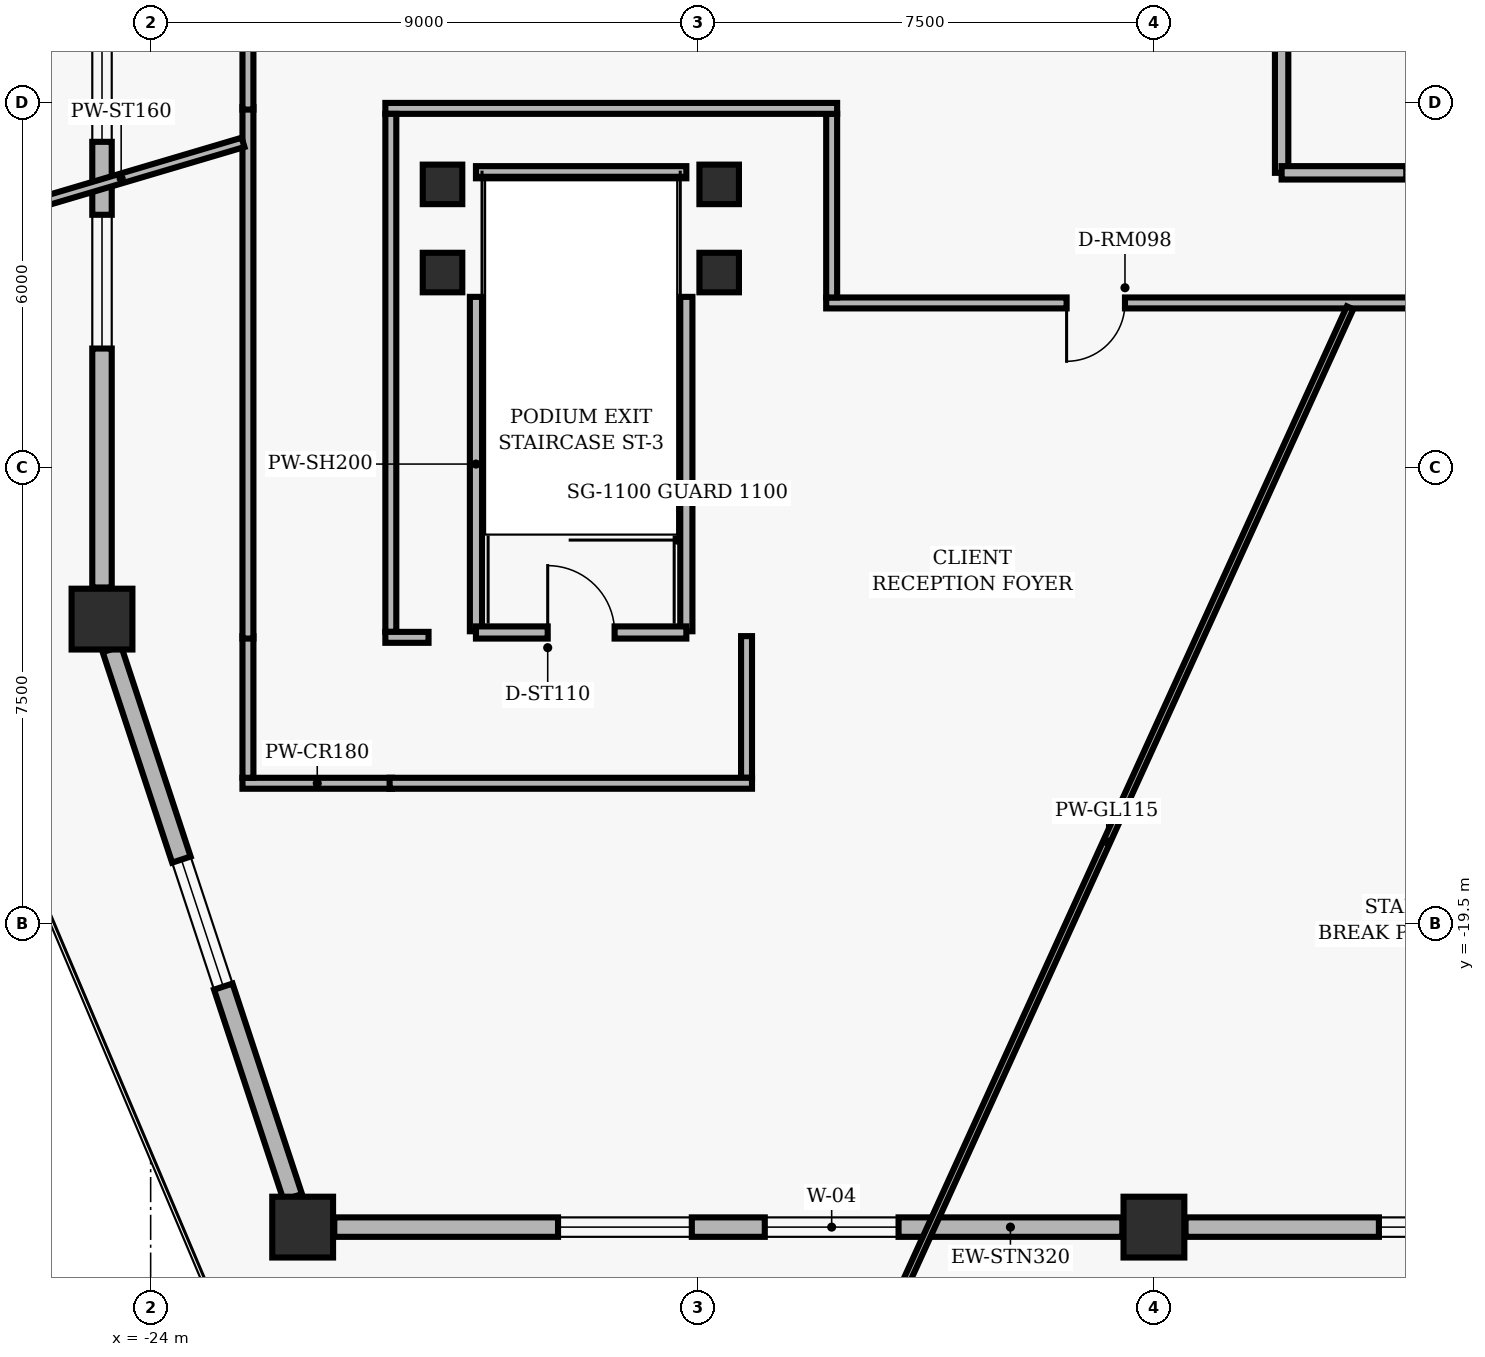
"""IFC4 building model, lengths in metres.
Left out: names, types, materials, properties, quantities, classifications, styles, units other than length and angle.
Written with IfcOpenShell. Run it as: python <this file> out.ifc"""

import sys

from ifc_helpers import new_model, si_unit, direction, frame, frame_2d, origin, origin_2d, place, context, subcontext, project, spatial, rectangle, extrude, element, fill, save


model = new_model("IFC4")
c1 = context("Model", 3, precision=1e-05, world=origin(), true_north=direction((0.0, 1.0)))
c2 = subcontext(c1, "Body", "Model", "MODEL_VIEW")
j1 = project(units=[si_unit("LENGTHUNIT", "METRE"), si_unit("PLANEANGLEUNIT", "RADIAN")], contexts=[c1])
p1 = place(None, origin())
s1 = spatial("IfcSite", under=j1, at=p1, CompositionType="ELEMENT")
p2 = place(p1, origin())
s2 = spatial("IfcBuilding", under=s1, at=p2, CompositionType="ELEMENT")
p3 = place(p2, frame((0.0, 0.0, 15.36)))
s3 = spatial("IfcBuildingStorey", under=s2, at=p3, CompositionType="ELEMENT", Elevation=15.36)
for number, where, z_axis, x_axis in (
    (1, (-21.5, -24.5, 0.0), (0.0, 0.0, 1.0), (1.0, 0.0, 0.0)),
    (2, (-7.5, -24.5, 0.0), (0.0, 0.0, 1.0), (1.0, 0.0, 0.0)),
    (3, (-24.8, -14.5, 0.0), (0.0, 0.0, 1.0), (1.0, 0.0, 0.0)),
):
    element("IfcColumn", number, at=place(p3, frame(where, z_axis=z_axis, x_axis=x_axis)), inside=s3, PredefinedType="COLUMN", context=c2, shape_type="SweptSolid", body=[
        extrude(rectangle(XDim=1.0, YDim=1.0, at=origin_2d()), origin(), (0.0, 0.0, 1.0), 3.52),
    ])
for number, where, z_axis, x_axis in (
    (4, (-19.2, -8.8, 0.0), (0.0, 0.0, 1.0), (1.0, 0.0, 0.0)),
    (5, (-14.65, -8.8, 0.0), (0.0, 0.0, 1.0), (1.0, 0.0, 0.0)),
    (6, (-19.2, -7.35, 0.0), (0.0, 0.0, 1.0), (1.0, 0.0, 0.0)),
    (7, (-14.65, -7.35, 0.0), (0.0, 0.0, 1.0), (1.0, 0.0, 0.0)),
):
    element("IfcColumn", number, at=place(p3, frame(where, z_axis=z_axis, x_axis=x_axis)), inside=s3, PredefinedType="COLUMN", context=c2, shape_type="SweptSolid", body=[
        extrude(rectangle(XDim=0.65, YDim=0.65, at=origin_2d()), origin(), (0.0, 0.0, 1.0), 3.52),
    ])
p4 = place(p3, frame((-8.02, -24.5, 0.0), z_axis=(0.0, 0.0, 1.0), x_axis=(-1.0, 0.0, 0.0)))
e8 = element("IfcWall", 8, at=p4, inside=s3, PredefinedType="SOLIDWALL", context=c2, shape_type="SweptSolid", body=[
    extrude(rectangle(XDim=12.96, YDim=0.32, at=frame_2d((6.48, 0.0))), origin(), (0.0, 0.0, 1.0), 1.65),
])
p5 = place(p4, frame((3.68, 0.0, 0.4)))
e9 = element("IfcOpeningElement", 9, at=p5, cuts=e8, PredefinedType="OPENING", context=c2, shape_type="SweptSolid", body=[
    extrude(rectangle(XDim=2.2, YDim=1.1, at=frame_2d((1.1, 0.55))), frame((0.0, 0.17, 0.0), z_axis=(0.0, -1.0, 0.0), x_axis=(1.0, 0.0, 0.0)), (0.0, 0.0, 1.0), 0.34),
])
p6 = place(p4, frame((7.08, 0.0, 0.4)))
e10 = element("IfcOpeningElement", 10, at=p6, cuts=e8, PredefinedType="OPENING", context=c2, shape_type="SweptSolid", body=[
    extrude(rectangle(XDim=2.2, YDim=1.1, at=frame_2d((1.1, 0.55))), frame((0.0, 0.17, 0.0), z_axis=(0.0, -1.0, 0.0), x_axis=(1.0, 0.0, 0.0)), (0.0, 0.0, 1.0), 0.34),
])
p7 = place(p3, frame((4.98, -24.5, 0.0), z_axis=(0.0, 0.0, 1.0), x_axis=(-1.0, 0.0, 0.0)))
e11 = element("IfcWall", 11, at=p7, inside=s3, PredefinedType="SOLIDWALL", context=c2, shape_type="SweptSolid", body=[
    extrude(rectangle(XDim=11.96, YDim=0.32, at=frame_2d((5.98, 0.0))), origin(), (0.0, 0.0, 1.0), 1.65),
])
p8 = place(p7, frame((3.18, 0.0, 0.4)))
e12 = element("IfcOpeningElement", 12, at=p8, cuts=e11, PredefinedType="OPENING", context=c2, shape_type="SweptSolid", body=[
    extrude(rectangle(XDim=2.2, YDim=1.1, at=frame_2d((1.1, 0.55))), frame((0.0, 0.17, 0.0), z_axis=(0.0, -1.0, 0.0), x_axis=(1.0, 0.0, 0.0)), (0.0, 0.0, 1.0), 0.34),
])
p9 = place(p7, frame((6.58, 0.0, 0.4)))
e13 = element("IfcOpeningElement", 13, at=p9, cuts=e11, PredefinedType="OPENING", context=c2, shape_type="SweptSolid", body=[
    extrude(rectangle(XDim=2.2, YDim=1.1, at=frame_2d((1.1, 0.55))), frame((0.0, 0.17, 0.0), z_axis=(0.0, -1.0, 0.0), x_axis=(1.0, 0.0, 0.0)), (0.0, 0.0, 1.0), 0.34),
])
p10 = place(p3, frame((-24.8, -13.98, 0.0), z_axis=(0.0, 0.0, 1.0), x_axis=(0.0, 1.0, 0.0)))
e14 = element("IfcWall", 14, at=p10, inside=s3, PredefinedType="SOLIDWALL", context=c2, shape_type="SweptSolid", body=[
    extrude(rectangle(XDim=13.46, YDim=0.32, at=frame_2d((6.73, 0.0))), origin(), (0.0, 0.0, 1.0), 1.65),
])
p11 = place(p10, frame((3.93, 0.0, 0.4)))
e15 = element("IfcOpeningElement", 15, at=p11, cuts=e14, PredefinedType="OPENING", context=c2, shape_type="SweptSolid", body=[
    extrude(rectangle(XDim=2.2, YDim=1.1, at=frame_2d((1.1, 0.55))), frame((0.0, 0.17, 0.0), z_axis=(0.0, -1.0, 0.0), x_axis=(1.0, 0.0, 0.0)), (0.0, 0.0, 1.0), 0.34),
])
p12 = place(p10, frame((7.33, 0.0, 0.4)))
e16 = element("IfcOpeningElement", 16, at=p12, cuts=e14, PredefinedType="OPENING", context=c2, shape_type="SweptSolid", body=[
    extrude(rectangle(XDim=2.2, YDim=1.1, at=frame_2d((1.1, 0.55))), frame((0.0, 0.17, 0.0), z_axis=(0.0, -1.0, 0.0), x_axis=(1.0, 0.0, 0.0)), (0.0, 0.0, 1.0), 0.34),
])
p13 = place(p3, frame((-21.663, -24.006, 0.0), z_axis=(0.0, 0.0, 1.0), x_axis=(-0.313363070681, 0.949633395544, 0.0)))
e17 = element("IfcWall", 17, at=p13, inside=s3, PredefinedType="SOLIDWALL", context=c2, shape_type="SweptSolid", body=[
    extrude(rectangle(XDim=9.49, YDim=0.32, at=frame_2d((4.745, 0.0))), origin(), (0.0, 0.0, 1.0), 1.65),
])
p14 = place(p13, frame((3.645, 0.0, 0.4)))
e18 = element("IfcOpeningElement", 18, at=p14, cuts=e17, PredefinedType="OPENING", context=c2, shape_type="SweptSolid", body=[
    extrude(rectangle(XDim=2.2, YDim=1.1, at=frame_2d((1.1, 0.55))), frame((0.0, 0.17, 0.0), z_axis=(0.0, -1.0, 0.0), x_axis=(1.0, 0.0, 0.0)), (0.0, 0.0, 1.0), 0.34),
])
p15 = place(p3, frame((-5.4, -7.16, 0.0), z_axis=(0.0, 0.0, 1.0), x_axis=(0.0, 1.0, 0.0)))
e19 = element("IfcWall", 19, at=p15, inside=s3, PredefinedType="PARTITIONING", context=c2, shape_type="SweptSolid", body=[
    extrude(rectangle(XDim=2.71, YDim=0.22, at=frame_2d((1.355, 0.0))), origin(), (0.0, 0.0, 1.0), 3.073),
])
p16 = place(p3, frame((-5.4, -7.16, 0.0), z_axis=(0.0, 0.0, 1.0), x_axis=(1.0, 0.0, 0.0)))
e20 = element("IfcWall", 20, at=p16, inside=s3, PredefinedType="PARTITIONING", context=c2, shape_type="SweptSolid", body=[
    extrude(rectangle(XDim=5.4, YDim=0.22, at=frame_2d((2.7, 0.0))), origin(), (0.0, 0.0, 1.0), 3.073),
])
p17 = place(p16, frame((2.05, 0.0, 0.0)))
e21 = element("IfcOpeningElement", 21, at=p17, cuts=e20, PredefinedType="OPENING", context=c2, shape_type="SweptSolid", body=[
    extrude(rectangle(XDim=1.12, YDim=2.02, at=frame_2d((0.56, 1.01))), frame((0.0, 0.12, 0.0), z_axis=(0.0, -1.0, 0.0), x_axis=(1.0, 0.0, 0.0)), (0.0, 0.0, 1.0), 0.24),
])
for number, where, z_axis, x_axis in (
    (22, (-18.65, -14.7, 0.0), (0.0, 0.0, 1.0), (0.0, 1.0, 0.0)),
    (23, (-15.19, -14.7, 0.0), (0.0, 0.0, 1.0), (0.0, 1.0, 0.0)),
):
    element("IfcWall", number, at=place(p3, frame(where, z_axis=z_axis, x_axis=x_axis)), inside=s3, PredefinedType="PARTITIONING", context=c2, shape_type="SweptSolid", body=[
        extrude(rectangle(XDim=5.5, YDim=0.2, at=frame_2d((2.75, 0.0))), origin(), (0.0, 0.0, 1.0), 3.073),
    ])
p18 = place(p3, frame((-18.65, -7.15, 0.0), z_axis=(0.0, 0.0, 1.0), x_axis=(1.0, 0.0, 0.0)))
e24 = element("IfcWall", 24, at=p18, inside=s3, PredefinedType="PARTITIONING", context=c2, shape_type="SweptSolid", body=[
    extrude(rectangle(XDim=3.46, YDim=0.2, at=frame_2d((1.73, 0.0))), origin(), (0.0, 0.0, 1.0), 3.073),
])
p19 = place(p3, frame((-18.65, -14.72, 0.0), z_axis=(0.0, 0.0, 1.0), x_axis=(1.0, 0.0, 0.0)))
e25 = element("IfcWall", 25, at=p19, inside=s3, PredefinedType="PARTITIONING", context=c2, shape_type="SweptSolid", body=[
    extrude(rectangle(XDim=3.46, YDim=0.2, at=frame_2d((1.73, 0.0))), origin(), (0.0, 0.0, 1.0), 3.073),
])
p20 = place(p19, frame((1.18, 0.0, 0.0)))
e26 = element("IfcOpeningElement", 26, at=p20, cuts=e25, PredefinedType="OPENING", context=c2, shape_type="SweptSolid", body=[
    extrude(rectangle(XDim=1.1, YDim=2.04, at=frame_2d((0.55, 1.02))), frame((0.0, 0.11, 0.0), z_axis=(0.0, -1.0, 0.0), x_axis=(1.0, 0.0, 0.0)), (0.0, 0.0, 1.0), 0.22),
])
p21 = place(p3, frame((-20.03, -17.2, 0.0), z_axis=(0.0, 0.0, 1.0), x_axis=(-1.0, 0.0, 0.0)))
e27 = element("IfcWall", 27, at=p21, inside=s3, PredefinedType="PARTITIONING", context=c2, shape_type="SweptSolid", body=[
    extrude(rectangle(XDim=2.46, YDim=0.18, at=frame_2d((1.23, 0.0))), origin(), (0.0, 0.0, 1.0), 3.073),
])
p22 = place(p3, frame((-22.4, -17.11, 0.0), z_axis=(0.0, 0.0, 1.0), x_axis=(0.0, 1.0, 0.0)))
e28 = element("IfcWall", 28, at=p22, inside=s3, PredefinedType="PARTITIONING", context=c2, shape_type="SweptSolid", body=[
    extrude(rectangle(XDim=2.33, YDim=0.18, at=frame_2d((1.165, 0.0))), origin(), (0.0, 0.0, 1.0), 3.073),
])
p23 = place(p3, frame((-22.4, -14.82, 0.0), z_axis=(0.0, 0.0, 1.0), x_axis=(0.0, 1.0, 0.0)))
e29 = element("IfcWall", 29, at=p23, inside=s3, PredefinedType="PARTITIONING", context=c2, shape_type="SweptSolid", body=[
    extrude(rectangle(XDim=8.74, YDim=0.18, at=frame_2d((4.37, 0.0))), origin(), (0.0, 0.0, 1.0), 3.073),
])
p24 = place(p3, frame((-22.4, -6.12, 0.0), z_axis=(0.0, 0.0, 1.0), x_axis=(0.0, 1.0, 0.0)))
e30 = element("IfcWall", 30, at=p24, inside=s3, PredefinedType="PARTITIONING", context=c2, shape_type="SweptSolid", body=[
    extrude(rectangle(XDim=2.33, YDim=0.18, at=frame_2d((1.165, 0.0))), origin(), (0.0, 0.0, 1.0), 3.073),
])
p25 = place(p3, frame((12.89, -9.3, 0.0), z_axis=(0.0, 0.0, 1.0), x_axis=(-1.0, 0.0, 0.0)))
e31 = element("IfcWall", 31, at=p25, inside=s3, PredefinedType="PARTITIONING", context=c2, shape_type="SweptSolid", body=[
    extrude(rectangle(XDim=25.78, YDim=0.18, at=frame_2d((12.89, 0.0))), origin(), (0.0, 0.0, 1.0), 2.587),
])
p26 = place(p25, frame((20.866, 0.0, 0.0)))
e32 = element("IfcOpeningElement", 32, at=p26, cuts=e31, PredefinedType="OPENING", context=c2, shape_type="SweptSolid", body=[
    extrude(rectangle(XDim=0.96, YDim=2.02, at=frame_2d((0.48, 1.01))), frame((0.0, 0.1, 0.0), z_axis=(0.0, -1.0, 0.0), x_axis=(1.0, 0.0, 0.0)), (0.0, 0.0, 1.0), 0.2),
])
p27 = place(p25, frame((12.748, 0.0, 0.0)))
e33 = element("IfcOpeningElement", 33, at=p27, cuts=e31, PredefinedType="OPENING", context=c2, shape_type="SweptSolid", body=[
    extrude(rectangle(XDim=0.96, YDim=2.02, at=frame_2d((0.48, 1.01))), frame((0.0, 0.1, 0.0), z_axis=(0.0, -1.0, 0.0), x_axis=(1.0, 0.0, 0.0)), (0.0, 0.0, 1.0), 0.2),
])
p28 = place(p25, frame((4.292, 0.0, 0.0)))
e34 = element("IfcOpeningElement", 34, at=p28, cuts=e31, PredefinedType="OPENING", context=c2, shape_type="SweptSolid", body=[
    extrude(rectangle(XDim=0.96, YDim=2.02, at=frame_2d((0.48, 1.01))), frame((0.0, 0.1, 0.0), z_axis=(0.0, -1.0, 0.0), x_axis=(1.0, 0.0, 0.0)), (0.0, 0.0, 1.0), 0.2),
])
p29 = place(p3, frame((-12.8, -9.21, 0.0), z_axis=(0.0, 0.0, 1.0), x_axis=(0.0, 1.0, 0.0)))
e35 = element("IfcWall", 35, at=p29, inside=s3, PredefinedType="PARTITIONING", context=c2, shape_type="SweptSolid", body=[
    extrude(rectangle(XDim=3.02, YDim=0.18, at=frame_2d((1.51, 0.0))), origin(), (0.0, 0.0, 1.0), 3.073),
])
p30 = place(p3, frame((-12.71, -6.1, 0.0), z_axis=(0.0, 0.0, 1.0), x_axis=(-1.0, 0.0, 0.0)))
e36 = element("IfcWall", 36, at=p30, inside=s3, PredefinedType="PARTITIONING", context=c2, shape_type="SweptSolid", body=[
    extrude(rectangle(XDim=7.43, YDim=0.18, at=frame_2d((3.715, 0.0))), origin(), (0.0, 0.0, 1.0), 3.073),
])
p31 = place(p3, frame((-20.05, -6.19, 0.0), z_axis=(0.0, 0.0, 1.0), x_axis=(0.0, -1.0, 0.0)))
e37 = element("IfcWall", 37, at=p31, inside=s3, PredefinedType="PARTITIONING", context=c2, shape_type="SweptSolid", body=[
    extrude(rectangle(XDim=8.52, YDim=0.18, at=frame_2d((4.26, 0.0))), origin(), (0.0, 0.0, 1.0), 2.126),
])
p32 = place(p3, frame((-20.14, -14.8, 0.0), z_axis=(0.0, 0.0, 1.0), x_axis=(1.0, 0.0, 0.0)))
e38 = element("IfcWall", 38, at=p32, inside=s3, PredefinedType="PARTITIONING", context=c2, shape_type="SweptSolid", body=[
    extrude(rectangle(XDim=0.71, YDim=0.18, at=frame_2d((0.355, 0.0))), origin(), (0.0, 0.0, 1.0), 3.073),
])
p33 = place(p3, frame((-14.2, -14.78, 0.0), z_axis=(0.0, 0.0, 1.0), x_axis=(0.0, -1.0, 0.0)))
e39 = element("IfcWall", 39, at=p33, inside=s3, PredefinedType="PARTITIONING", context=c2, shape_type="SweptSolid", body=[
    extrude(rectangle(XDim=2.33, YDim=0.18, at=frame_2d((1.165, 0.0))), origin(), (0.0, 0.0, 1.0), 3.073),
])
p34 = place(p3, frame((-14.11, -17.2, 0.0), z_axis=(0.0, 0.0, 1.0), x_axis=(-1.0, 0.0, 0.0)))
e40 = element("IfcWall", 40, at=p34, inside=s3, PredefinedType="PARTITIONING", context=c2, shape_type="SweptSolid", body=[
    extrude(rectangle(XDim=5.96, YDim=0.18, at=frame_2d((2.98, 0.0))), origin(), (0.0, 0.0, 1.0), 3.073),
])
p35 = place(p3, frame((-22.48, -6.659, 0.0), z_axis=(0.0, 0.0, 1.0), x_axis=(-0.958824609588, -0.283998887406, 0.0)))
e41 = element("IfcWall", 41, at=p35, inside=s3, PredefinedType="PARTITIONING", context=c2, shape_type="SweptSolid", body=[
    extrude(rectangle(XDim=4.182, YDim=0.16, at=frame_2d((2.091, 0.0))), origin(), (0.0, 0.0, 1.0), 3.073),
])
p36 = place(p3, frame((-4.275, -9.38, 0.0), z_axis=(0.0, 0.0, 1.0), x_axis=(-0.414697782226, -0.909959202062, 0.0)))
e42 = element("IfcWall", 42, at=p36, inside=s3, PredefinedType="MOVABLE", context=c2, shape_type="SweptSolid", body=[
    extrude(rectangle(XDim=19.298, YDim=0.115, at=frame_2d((9.649, 0.0))), origin(), (0.0, 0.0, 1.0), 3.073),
])
p37 = place(p5, origin())
e43 = element("IfcWindow", 43, at=p37, inside=s3, PartitioningType="SINGLE_PANEL", PredefinedType="WINDOW", context=c2, shape_type="SweptSolid", body=[
    extrude(rectangle(XDim=2.2, YDim=1.1, at=frame_2d((1.1, 0.55))), frame((0.0, 0.03, 0.0), z_axis=(0.0, -1.0, 0.0), x_axis=(1.0, 0.0, 0.0)), (0.0, 0.0, 1.0), 0.06),
])
fill(e9, e43)
p38 = place(p6, origin())
e44 = element("IfcWindow", 44, at=p38, inside=s3, PartitioningType="SINGLE_PANEL", PredefinedType="WINDOW", context=c2, shape_type="SweptSolid", body=[
    extrude(rectangle(XDim=2.2, YDim=1.1, at=frame_2d((1.1, 0.55))), frame((0.0, 0.03, 0.0), z_axis=(0.0, -1.0, 0.0), x_axis=(1.0, 0.0, 0.0)), (0.0, 0.0, 1.0), 0.06),
])
fill(e10, e44)
p39 = place(p9, origin())
e45 = element("IfcWindow", 45, at=p39, inside=s3, PartitioningType="SINGLE_PANEL", PredefinedType="WINDOW", context=c2, shape_type="SweptSolid", body=[
    extrude(rectangle(XDim=2.2, YDim=1.1, at=frame_2d((1.1, 0.55))), frame((0.0, 0.03, 0.0), z_axis=(0.0, -1.0, 0.0), x_axis=(1.0, 0.0, 0.0)), (0.0, 0.0, 1.0), 0.06),
])
fill(e13, e45)
p40 = place(p11, origin())
e46 = element("IfcWindow", 46, at=p40, inside=s3, PartitioningType="SINGLE_PANEL", PredefinedType="WINDOW", context=c2, shape_type="SweptSolid", body=[
    extrude(rectangle(XDim=2.2, YDim=1.1, at=frame_2d((1.1, 0.55))), frame((0.0, 0.03, 0.0), z_axis=(0.0, -1.0, 0.0), x_axis=(1.0, 0.0, 0.0)), (0.0, 0.0, 1.0), 0.06),
])
fill(e15, e46)
p41 = place(p12, origin())
e47 = element("IfcWindow", 47, at=p41, inside=s3, PartitioningType="SINGLE_PANEL", PredefinedType="WINDOW", context=c2, shape_type="SweptSolid", body=[
    extrude(rectangle(XDim=2.2, YDim=1.1, at=frame_2d((1.1, 0.55))), frame((0.0, 0.03, 0.0), z_axis=(0.0, -1.0, 0.0), x_axis=(1.0, 0.0, 0.0)), (0.0, 0.0, 1.0), 0.06),
])
fill(e16, e47)
p42 = place(p14, origin())
e48 = element("IfcWindow", 48, at=p42, inside=s3, PartitioningType="SINGLE_PANEL", PredefinedType="WINDOW", context=c2, shape_type="SweptSolid", body=[
    extrude(rectangle(XDim=2.2, YDim=1.1, at=frame_2d((1.1, 0.55))), frame((0.0, 0.03, 0.0), z_axis=(0.0, -1.0, 0.0), x_axis=(1.0, 0.0, 0.0)), (0.0, 0.0, 1.0), 0.06),
])
fill(e18, e48)
p43 = place(p20, origin())
e49 = element("IfcDoor", 49, at=p43, inside=s3, OperationType="SINGLE_SWING_LEFT", PredefinedType="DOOR", context=c2, shape_type="SweptSolid", body=[
    extrude(rectangle(XDim=1.1, YDim=2.04, at=frame_2d((0.55, 1.02))), frame((0.0, 0.025, 0.0), z_axis=(0.0, -1.0, 0.0), x_axis=(1.0, 0.0, 0.0)), (0.0, 0.0, 1.0), 0.05),
])
fill(e26, e49)
p44 = place(p26, origin())
e50 = element("IfcDoor", 50, at=p44, inside=s3, OperationType="SINGLE_SWING_RIGHT", PredefinedType="DOOR", context=c2, shape_type="SweptSolid", body=[
    extrude(rectangle(XDim=0.96, YDim=2.02, at=frame_2d((0.48, 1.01))), frame((0.0, 0.025, 0.0), z_axis=(0.0, -1.0, 0.0), x_axis=(1.0, 0.0, 0.0)), (0.0, 0.0, 1.0), 0.05),
])
fill(e32, e50)
save(model, sys.argv[1])
